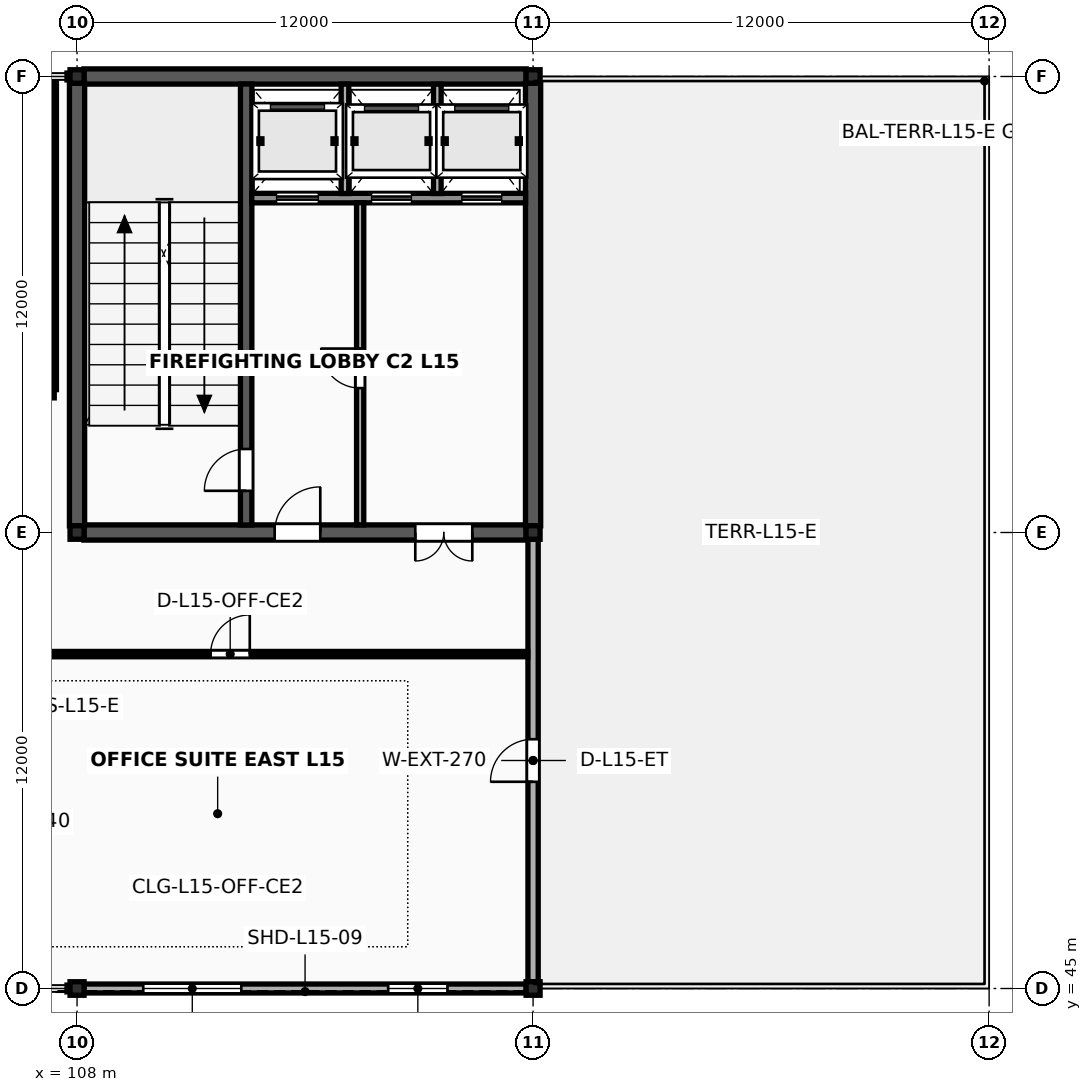
"""IFC4 building model, lengths in metres.
Left out: names, types, materials, properties, quantities, classifications, styles, units other than length and angle.
Written with IfcOpenShell. Run it as: python <this file> out.ifc"""

import sys

from ifc_helpers import new_model, si_unit, direction, frame, frame_2d, origin, origin_2d, place, context, subcontext, project, spatial, rectangle, i_section, extrude, element, fill, save


model = new_model("IFC4")
c1 = context("Model", 3, precision=1e-05, world=origin(), true_north=direction((0.0, 1.0)))
c2 = subcontext(c1, "Body", "Model", "MODEL_VIEW")
j1 = project(units=[si_unit("LENGTHUNIT", "METRE"), si_unit("PLANEANGLEUNIT", "RADIAN")], contexts=[c1])
p1 = place(None, origin())
s1 = spatial("IfcSite", under=j1, at=p1, CompositionType="ELEMENT")
p2 = place(p1, origin())
s2 = spatial("IfcBuilding", under=s1, at=p2, CompositionType="ELEMENT")
p3 = place(p2, frame((0.0, 0.0, 61.6)))
s3 = spatial("IfcBuildingStorey", under=s2, at=p3, CompositionType="ELEMENT", Elevation=61.6)
for number, where, z_axis, x_axis in (
    (1, (108.0, 45.0, 0.0), (0.0, 0.0, 1.0), (1.0, 0.0, 0.0)),
    (2, (108.0, 57.0, 0.0), (0.0, 0.0, 1.0), (1.0, 0.0, 0.0)),
    (3, (108.0, 69.0, 0.0), (0.0, 0.0, 1.0), (1.0, 0.0, 0.0)),
    (4, (120.0, 45.0, 0.0), (0.0, 0.0, 1.0), (1.0, 0.0, 0.0)),
    (5, (120.0, 57.0, 0.0), (0.0, 0.0, 1.0), (1.0, 0.0, 0.0)),
    (6, (120.0, 69.0, 0.0), (0.0, 0.0, 1.0), (1.0, 0.0, 0.0)),
):
    element("IfcColumn", number, at=place(p3, frame(where, z_axis=z_axis, x_axis=x_axis)), inside=s3, PredefinedType="COLUMN", context=c2, shape_type="SweptSolid", body=[
        extrude(i_section(OverallWidth=0.369, OverallDepth=0.356, WebThickness=0.011, FlangeThickness=0.018, FilletRadius=0.018, at=origin_2d()), origin(), (0.0, 0.0, 1.0), 4.0),
    ])
p4 = place(p3, frame((108.181, 57.0, 0.0), z_axis=(0.0, 0.0, 1.0), x_axis=(1.0, 0.0, 0.0)))
e7 = element("IfcWall", 7, at=p4, inside=s3, PredefinedType="SHEAR", context=c2, shape_type="SweptSolid", body=[
    extrude(rectangle(XDim=11.637, YDim=0.4, at=frame_2d((5.819, 0.0))), origin(), (0.0, 0.0, 1.0), 3.843),
])
p5 = place(p4, frame((5.019, 0.0, 0.0)))
e8 = element("IfcOpeningElement", 8, at=p5, cuts=e7, PredefinedType="OPENING", context=c2, shape_type="SweptSolid", body=[
    extrude(rectangle(XDim=1.2, YDim=2.2, at=frame_2d((0.6, 1.1))), frame((0.0, 0.215, 0.0), z_axis=(0.0, -1.0, 0.0), x_axis=(1.0, 0.0, 0.0)), (0.0, 0.0, 1.0), 0.43),
])
p6 = place(p4, frame((8.719, 0.0, 0.0)))
e9 = element("IfcOpeningElement", 9, at=p6, cuts=e7, PredefinedType="OPENING", context=c2, shape_type="SweptSolid", body=[
    extrude(rectangle(XDim=1.5, YDim=2.25, at=frame_2d((0.75, 1.125))), frame((0.0, 0.215, 0.0), z_axis=(0.0, -1.0, 0.0), x_axis=(1.0, 0.0, 0.0)), (0.0, 0.0, 1.0), 0.43),
])
p7 = place(p3, frame((108.181, 69.0, 0.0), z_axis=(0.0, 0.0, 1.0), x_axis=(1.0, 0.0, 0.0)))
e10 = element("IfcWall", 10, at=p7, inside=s3, PredefinedType="SHEAR", context=c2, shape_type="SweptSolid", body=[
    extrude(rectangle(XDim=11.637, YDim=0.4, at=frame_2d((5.819, 0.0))), origin(), (0.0, 0.0, 1.0), 3.843),
])
for number, where, z_axis, x_axis in (
    (11, (108.0, 57.175, 0.0), (0.0, 0.0, 1.0), (0.0, 1.0, 0.0)),
    (12, (120.0, 57.175, 0.0), (0.0, 0.0, 1.0), (0.0, 1.0, 0.0)),
):
    element("IfcWall", number, at=place(p3, frame(where, z_axis=z_axis, x_axis=x_axis)), inside=s3, PredefinedType="SHEAR", context=c2, shape_type="SweptSolid", body=[
        extrude(rectangle(XDim=11.65, YDim=0.4, at=frame_2d((5.825, 0.0))), origin(), (0.0, 0.0, 1.0), 3.843),
    ])
p8 = place(p3, frame((112.45, 57.197, 0.0), z_axis=(0.0, 0.0, 1.0), x_axis=(0.0, 1.0, 0.0)))
e13 = element("IfcWall", 13, at=p8, inside=s3, PredefinedType="SHEAR", context=c2, shape_type="SweptSolid", body=[
    extrude(rectangle(XDim=11.606, YDim=0.3, at=frame_2d((5.803, 0.0))), origin(), (0.0, 0.0, 1.0), 3.843),
])
p9 = place(p8, frame((0.9, 0.0, 0.0)))
e14 = element("IfcOpeningElement", 14, at=p9, cuts=e13, PredefinedType="OPENING", context=c2, shape_type="SweptSolid", body=[
    extrude(rectangle(XDim=1.1, YDim=2.2, at=frame_2d((0.55, 1.1))), frame((0.0, 0.165, 0.0), z_axis=(0.0, -1.0, 0.0), x_axis=(1.0, 0.0, 0.0)), (0.0, 0.0, 1.0), 0.33),
])
p10 = place(p3, frame((112.597, 65.8, 0.0), z_axis=(0.0, 0.0, 1.0), x_axis=(1.0, 0.0, 0.0)))
e15 = element("IfcWall", 15, at=p10, inside=s3, PredefinedType="SOLIDWALL", context=c2, shape_type="SweptSolid", body=[
    extrude(rectangle(XDim=7.206, YDim=0.25, at=frame_2d((3.603, 0.0))), origin(), (0.0, 0.0, 1.0), 3.843),
])
p11 = place(p10, frame((0.653, 0.0, 0.0)))
e16 = element("IfcOpeningElement", 16, at=p11, cuts=e15, PredefinedType="OPENING", context=c2, shape_type="SweptSolid", body=[
    extrude(rectangle(XDim=1.1, YDim=2.24, at=frame_2d((0.55, 1.12))), frame((0.0, 0.14, 0.0), z_axis=(0.0, -1.0, 0.0), x_axis=(1.0, 0.0, 0.0)), (0.0, 0.0, 1.0), 0.28),
])
p12 = place(p10, frame((3.153, 0.0, 0.0)))
e17 = element("IfcOpeningElement", 17, at=p12, cuts=e15, PredefinedType="OPENING", context=c2, shape_type="SweptSolid", body=[
    extrude(rectangle(XDim=1.05, YDim=2.2, at=frame_2d((0.525, 1.1))), frame((0.0, 0.14, 0.0), z_axis=(0.0, -1.0, 0.0), x_axis=(1.0, 0.0, 0.0)), (0.0, 0.0, 1.0), 0.28),
])
p13 = place(p10, frame((5.528, 0.0, 0.0)))
e18 = element("IfcOpeningElement", 18, at=p13, cuts=e15, PredefinedType="OPENING", context=c2, shape_type="SweptSolid", body=[
    extrude(rectangle(XDim=1.05, YDim=2.2, at=frame_2d((0.525, 1.1))), frame((0.0, 0.14, 0.0), z_axis=(0.0, -1.0, 0.0), x_axis=(1.0, 0.0, 0.0)), (0.0, 0.0, 1.0), 0.28),
])
for number, where, z_axis, x_axis in (
    (19, (115.05, 65.92, 0.0), (0.0, 0.0, 1.0), (0.0, 1.0, 0.0)),
    (20, (117.48, 65.92, 0.0), (0.0, 0.0, 1.0), (0.0, 1.0, 0.0)),
):
    element("IfcWall", number, at=place(p3, frame(where, z_axis=z_axis, x_axis=x_axis)), inside=s3, PredefinedType="SOLIDWALL", context=c2, shape_type="SweptSolid", body=[
        extrude(rectangle(XDim=2.88, YDim=0.2, at=frame_2d((1.44, 0.0))), origin(), (0.0, 0.0, 1.0), 3.833),
    ])
p14 = place(p3, frame((115.45, 57.2, 0.0), z_axis=(0.0, 0.0, 1.0), x_axis=(0.0, 1.0, 0.0)))
e21 = element("IfcWall", 21, at=p14, inside=s3, PredefinedType="SOLIDWALL", context=c2, shape_type="SweptSolid", body=[
    extrude(rectangle(XDim=8.48, YDim=0.19, at=frame_2d((4.24, 0.0))), origin(), (0.0, 0.0, 1.0), 3.833),
])
p15 = place(p14, frame((3.6, 0.0, 0.0)))
e22 = element("IfcOpeningElement", 22, at=p15, cuts=e21, PredefinedType="OPENING", context=c2, shape_type="SweptSolid", body=[
    extrude(rectangle(XDim=1.04, YDim=2.18, at=frame_2d((0.52, 1.09))), frame((0.0, 0.11, 0.0), z_axis=(0.0, -1.0, 0.0), x_axis=(1.0, 0.0, 0.0)), (0.0, 0.0, 1.0), 0.22),
])
p16 = place(p3, frame((108.183, 45.0, 0.0), z_axis=(0.0, 0.0, 1.0), x_axis=(1.0, 0.0, 0.0)))
e23 = element("IfcWall", 23, at=p16, inside=s3, PredefinedType="SOLIDWALL", context=c2, shape_type="SweptSolid", body=[
    extrude(rectangle(XDim=11.635, YDim=0.235, at=frame_2d((5.817, 0.0))), origin(), (0.0, 0.0, 1.0), 3.296),
])
p17 = place(p16, frame((1.56, 0.0, 0.78)))
e24 = element("IfcOpeningElement", 24, at=p17, cuts=e23, PredefinedType="OPENING", context=c2, shape_type="SweptSolid", body=[
    extrude(rectangle(XDim=2.58, YDim=1.74, at=frame_2d((1.29, 0.87))), frame((0.0, 0.133, 0.0), z_axis=(0.0, -1.0, 0.0), x_axis=(1.0, 0.0, 0.0)), (0.0, 0.0, 1.0), 0.265),
])
p18 = place(p16, frame((8.005, 0.0, 0.78)))
e25 = element("IfcOpeningElement", 25, at=p18, cuts=e23, PredefinedType="OPENING", context=c2, shape_type="SweptSolid", body=[
    extrude(rectangle(XDim=1.56, YDim=1.9, at=frame_2d((0.78, 0.95))), frame((0.0, 0.133, 0.0), z_axis=(0.0, -1.0, 0.0), x_axis=(1.0, 0.0, 0.0)), (0.0, 0.0, 1.0), 0.265),
])
p19 = place(p3, frame((120.0, 45.176, 0.0), z_axis=(0.0, 0.0, 1.0), x_axis=(0.0, 1.0, 0.0)))
e26 = element("IfcWall", 26, at=p19, inside=s3, PredefinedType="SOLIDWALL", context=c2, shape_type="SweptSolid", body=[
    extrude(rectangle(XDim=11.648, YDim=0.27, at=frame_2d((5.824, 0.0))), origin(), (0.0, 0.0, 1.0), 3.296),
])
p20 = place(p19, frame((5.264, 0.0, 0.0)))
e27 = element("IfcOpeningElement", 27, at=p20, cuts=e26, PredefinedType="OPENING", context=c2, shape_type="SweptSolid", body=[
    extrude(rectangle(XDim=1.12, YDim=2.18, at=frame_2d((0.56, 1.09))), frame((0.0, 0.15, 0.0), z_axis=(0.0, -1.0, 0.0), x_axis=(1.0, 0.0, 0.0)), (0.0, 0.0, 1.0), 0.3),
])
p21 = place(p3, frame((104.2, 53.8, 0.0), z_axis=(0.0, 0.0, 1.0), x_axis=(1.0, 0.0, 0.0)))
e28 = element("IfcWall", 28, at=p21, inside=s3, PredefinedType="PARTITIONING", context=c2, shape_type="SweptSolid", body=[
    extrude(rectangle(XDim=15.66, YDim=0.14, at=frame_2d((7.83, 0.0))), origin(), (0.0, 0.0, 1.0), 2.88),
])
p22 = place(p21, frame((7.315, 0.0, 0.0)))
e29 = element("IfcOpeningElement", 29, at=p22, cuts=e28, PredefinedType="OPENING", context=c2, shape_type="SweptSolid", body=[
    extrude(rectangle(XDim=1.03, YDim=2.17, at=frame_2d((0.515, 1.085))), frame((0.0, 0.085, 0.0), z_axis=(0.0, -1.0, 0.0), x_axis=(1.0, 0.0, 0.0)), (0.0, 0.0, 1.0), 0.17),
])
p23 = place(p3, frame((72.6, 60.6, 0.0), z_axis=(0.0, 0.0, 1.0), x_axis=(1.0, 0.0, 0.0)))
e30 = element("IfcWall", 30, at=p23, inside=s3, PredefinedType="PARTITIONING", context=c2, shape_type="SweptSolid", body=[
    extrude(rectangle(XDim=34.8, YDim=0.115, at=frame_2d((17.4, 0.0))), origin(), (0.0, 0.0, 1.0), 2.88),
])
p24 = place(p23, frame((16.565, 0.0, 0.0)))
e31 = element("IfcOpeningElement", 31, at=p24, cuts=e30, PredefinedType="OPENING", context=c2, shape_type="SweptSolid", body=[
    extrude(rectangle(XDim=1.67, YDim=2.35, at=frame_2d((0.835, 1.175))), frame((0.0, 0.073, 0.0), z_axis=(0.0, -1.0, 0.0), x_axis=(1.0, 0.0, 0.0)), (0.0, 0.0, 1.0), 0.145),
])
p25 = place(p3, frame((107.4, 60.76, 0.0), z_axis=(0.0, 0.0, 1.0), x_axis=(0.0, 1.0, 0.0)))
e32 = element("IfcWall", 32, at=p25, inside=s3, PredefinedType="PARTITIONING", context=c2, shape_type="SweptSolid", body=[
    extrude(rectangle(XDim=8.1, YDim=0.115, at=frame_2d((4.05, 0.0))), origin(), (0.0, 0.0, 1.0), 2.88),
])
p26 = place(p17, origin())
e33 = element("IfcWindow", 33, at=p26, inside=s3, PartitioningType="DOUBLE_PANEL_VERTICAL", PredefinedType="WINDOW", context=c2, shape_type="SweptSolid", body=[
    extrude(rectangle(XDim=2.58, YDim=1.74, at=frame_2d((1.29, 0.87))), frame((0.0, 0.03, 0.0), z_axis=(0.0, -1.0, 0.0), x_axis=(1.0, 0.0, 0.0)), (0.0, 0.0, 1.0), 0.06),
])
fill(e24, e33)
p27 = place(p18, origin())
e34 = element("IfcWindow", 34, at=p27, inside=s3, PartitioningType="SINGLE_PANEL", PredefinedType="WINDOW", context=c2, shape_type="SweptSolid", body=[
    extrude(rectangle(XDim=1.56, YDim=1.9, at=frame_2d((0.78, 0.95))), frame((0.0, 0.03, 0.0), z_axis=(0.0, -1.0, 0.0), x_axis=(1.0, 0.0, 0.0)), (0.0, 0.0, 1.0), 0.06),
])
fill(e25, e34)
p28 = place(p20, origin())
e35 = element("IfcDoor", 35, at=p28, inside=s3, OperationType="SINGLE_SWING_LEFT", PredefinedType="DOOR", context=c2, shape_type="SweptSolid", body=[
    extrude(rectangle(XDim=1.12, YDim=2.18, at=frame_2d((0.56, 1.09))), frame((0.0, 0.025, 0.0), z_axis=(0.0, -1.0, 0.0), x_axis=(1.0, 0.0, 0.0)), (0.0, 0.0, 1.0), 0.05),
])
fill(e27, e35)
p29 = place(p9, origin())
e36 = element("IfcDoor", 36, at=p29, inside=s3, OperationType="SINGLE_SWING_LEFT", PredefinedType="DOOR", context=c2, shape_type="SweptSolid", body=[
    extrude(rectangle(XDim=1.1, YDim=2.2, at=frame_2d((0.55, 1.1))), frame((0.0, 0.025, 0.0), z_axis=(0.0, -1.0, 0.0), x_axis=(1.0, 0.0, 0.0)), (0.0, 0.0, 1.0), 0.05),
])
fill(e14, e36)
p30 = place(p15, origin())
e37 = element("IfcDoor", 37, at=p30, inside=s3, OperationType="SINGLE_SWING_RIGHT", PredefinedType="DOOR", context=c2, shape_type="SweptSolid", body=[
    extrude(rectangle(XDim=1.04, YDim=2.18, at=frame_2d((0.52, 1.09))), frame((0.0, 0.025, 0.0), z_axis=(0.0, -1.0, 0.0), x_axis=(1.0, 0.0, 0.0)), (0.0, 0.0, 1.0), 0.05),
])
fill(e22, e37)
p31 = place(p5, origin())
e38 = element("IfcDoor", 38, at=p31, inside=s3, OperationType="SINGLE_SWING_RIGHT", PredefinedType="DOOR", context=c2, shape_type="SweptSolid", body=[
    extrude(rectangle(XDim=1.2, YDim=2.2, at=frame_2d((0.6, 1.1))), frame((0.0, 0.025, 0.0), z_axis=(0.0, -1.0, 0.0), x_axis=(1.0, 0.0, 0.0)), (0.0, 0.0, 1.0), 0.05),
])
fill(e8, e38)
p32 = place(p6, origin())
e39 = element("IfcDoor", 39, at=p32, inside=s3, OperationType="DOUBLE_DOOR_SINGLE_SWING", PredefinedType="DOOR", context=c2, shape_type="SweptSolid", body=[
    extrude(rectangle(XDim=1.5, YDim=2.25, at=frame_2d((0.75, 1.125))), frame((0.0, 0.025, 0.0), z_axis=(0.0, -1.0, 0.0), x_axis=(1.0, 0.0, 0.0)), (0.0, 0.0, 1.0), 0.05),
])
fill(e9, e39)
p33 = place(p11, origin())
e40 = element("IfcDoor", 40, at=p33, inside=s3, OperationType="SLIDING_TO_LEFT", PredefinedType="USERDEFINED", context=c2, shape_type="SweptSolid", body=[
    extrude(rectangle(XDim=1.1, YDim=2.24, at=frame_2d((0.55, 1.12))), frame((0.0, 0.025, 0.0), z_axis=(0.0, -1.0, 0.0), x_axis=(1.0, 0.0, 0.0)), (0.0, 0.0, 1.0), 0.05),
])
fill(e16, e40)
p34 = place(p12, origin())
e41 = element("IfcDoor", 41, at=p34, inside=s3, OperationType="SLIDING_TO_LEFT", PredefinedType="USERDEFINED", context=c2, shape_type="SweptSolid", body=[
    extrude(rectangle(XDim=1.05, YDim=2.2, at=frame_2d((0.525, 1.1))), frame((0.0, 0.025, 0.0), z_axis=(0.0, -1.0, 0.0), x_axis=(1.0, 0.0, 0.0)), (0.0, 0.0, 1.0), 0.05),
])
fill(e17, e41)
p35 = place(p13, origin())
e42 = element("IfcDoor", 42, at=p35, inside=s3, OperationType="SLIDING_TO_LEFT", PredefinedType="USERDEFINED", context=c2, shape_type="SweptSolid", body=[
    extrude(rectangle(XDim=1.05, YDim=2.2, at=frame_2d((0.525, 1.1))), frame((0.0, 0.025, 0.0), z_axis=(0.0, -1.0, 0.0), x_axis=(1.0, 0.0, 0.0)), (0.0, 0.0, 1.0), 0.05),
])
fill(e18, e42)
p36 = place(p22, origin())
e43 = element("IfcDoor", 43, at=p36, inside=s3, OperationType="SINGLE_SWING_RIGHT", PredefinedType="DOOR", context=c2, shape_type="SweptSolid", body=[
    extrude(rectangle(XDim=1.03, YDim=2.17, at=frame_2d((0.515, 1.085))), frame((0.0, 0.025, 0.0), z_axis=(0.0, -1.0, 0.0), x_axis=(1.0, 0.0, 0.0)), (0.0, 0.0, 1.0), 0.05),
])
fill(e29, e43)
save(model, sys.argv[1])
